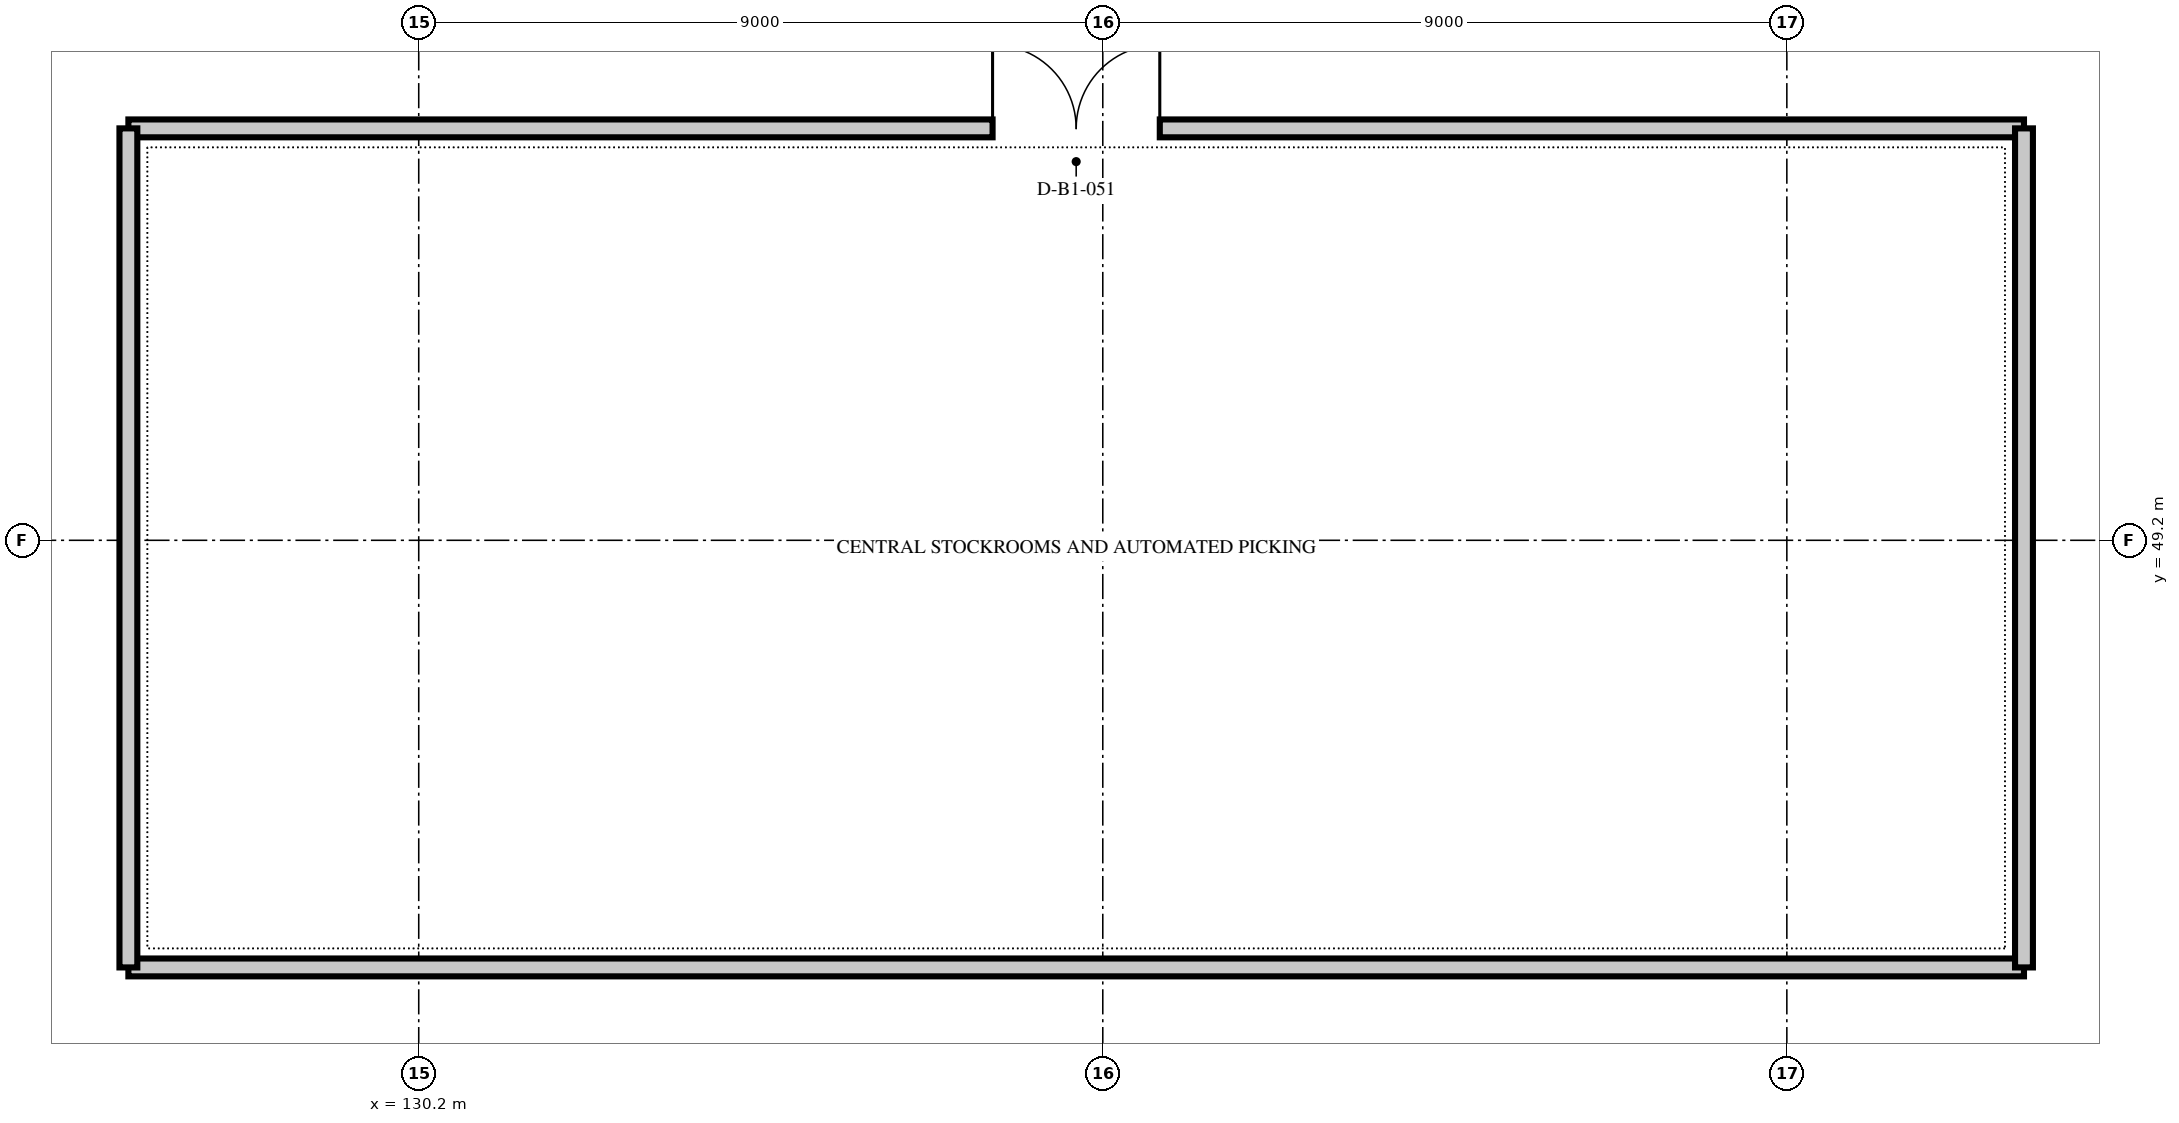
"""IFC4 building model, lengths in metres.
Left out: names, types, materials, properties, quantities, classifications, styles, units other than length and angle.
Written with IfcOpenShell. Run it as: python <this file> out.ifc"""

import sys

from ifc_helpers import new_model, si_unit, direction, frame, frame_2d, origin, place, context, subcontext, project, spatial, rectangle, extrude, element, fill, save


model = new_model("IFC4")
c1 = context("Model", 3, precision=1e-05, world=origin(), true_north=direction((0.0, 1.0)))
c2 = subcontext(c1, "Body", "Model", "MODEL_VIEW")
j1 = project(units=[si_unit("LENGTHUNIT", "METRE"), si_unit("PLANEANGLEUNIT", "RADIAN")], contexts=[c1])
p1 = place(None, origin())
s1 = spatial("IfcSite", under=j1, at=p1, CompositionType="ELEMENT")
p2 = place(p1, origin())
s2 = spatial("IfcBuilding", under=s1, at=p2, CompositionType="ELEMENT")
p3 = place(p2, frame((0.0, 0.0, -4.8)))
s3 = spatial("IfcBuildingStorey", under=s2, at=p3, CompositionType="ELEMENT", Elevation=-4.8)
p4 = place(p3, frame((126.38, 54.62, 0.0), z_axis=(0.0, 0.0, 1.0), x_axis=(1.0, 0.0, 0.0)))
e1 = element("IfcWall", 1, at=p4, inside=s3, PredefinedType="PARTITIONING", context=c2, shape_type="SweptSolid", body=[
    extrude(rectangle(XDim=24.94, YDim=0.235, at=frame_2d((12.47, 0.0))), origin(), (0.0, 0.0, 1.0), 4.5),
])
p5 = place(p4, frame((11.37, 0.0, 0.0)))
e2 = element("IfcOpeningElement", 2, at=p5, cuts=e1, PredefinedType="OPENING", context=c2, shape_type="SweptSolid", body=[
    extrude(rectangle(XDim=2.2, YDim=2.5, at=frame_2d((1.1, 1.25))), frame((0.0, 0.129, 0.0), z_axis=(0.0, -1.0, 0.0), x_axis=(1.0, 0.0, 0.0)), (0.0, 0.0, 1.0), 0.259),
])
p6 = place(p3, frame((151.32, 43.58, 0.0), z_axis=(0.0, 0.0, 1.0), x_axis=(-1.0, 0.0, 0.0)))
e3 = element("IfcWall", 3, at=p6, inside=s3, PredefinedType="PARTITIONING", context=c2, shape_type="SweptSolid", body=[
    extrude(rectangle(XDim=24.94, YDim=0.235, at=frame_2d((12.47, 0.0))), origin(), (0.0, 0.0, 1.0), 4.5),
])
for number, where, z_axis, x_axis in (
    (4, (126.38, 43.58, 0.0), (0.0, 0.0, 1.0), (0.0, 1.0, 0.0)),
    (5, (151.32, 54.62, 0.0), (0.0, 0.0, 1.0), (0.0, -1.0, 0.0)),
):
    element("IfcWall", number, at=place(p3, frame(where, z_axis=z_axis, x_axis=x_axis)), inside=s3, PredefinedType="PARTITIONING", context=c2, shape_type="SweptSolid", body=[
        extrude(rectangle(XDim=11.04, YDim=0.235, at=frame_2d((5.52, 0.0))), origin(), (0.0, 0.0, 1.0), 4.5),
    ])
p7 = place(p5, origin())
e6 = element("IfcDoor", 6, at=p7, inside=s3, OperationType="DOUBLE_DOOR_SINGLE_SWING", PredefinedType="DOOR", context=c2, shape_type="SweptSolid", body=[
    extrude(rectangle(XDim=2.2, YDim=2.5, at=frame_2d((1.1, 1.25))), frame((0.0, 0.025, 0.0), z_axis=(0.0, -1.0, 0.0), x_axis=(1.0, 0.0, 0.0)), (0.0, 0.0, 1.0), 0.05),
])
fill(e2, e6)
save(model, sys.argv[1])
